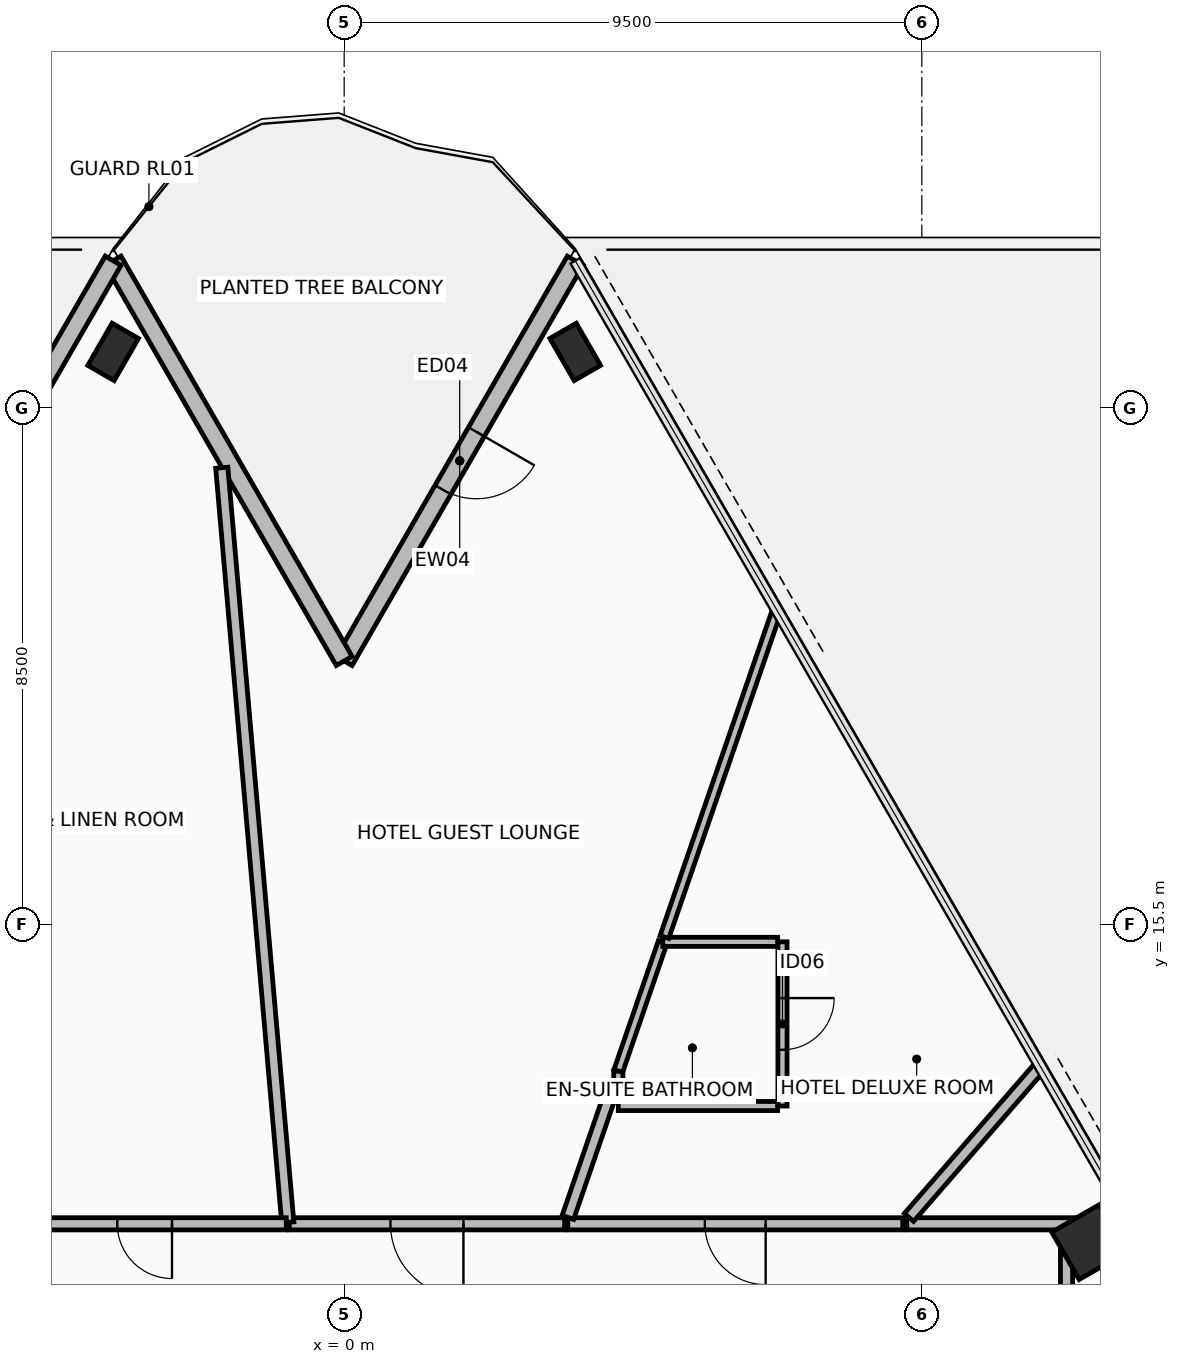
"""IFC4 building model, lengths in metres.
Left out: names, types, materials, properties, quantities, classifications, styles, units other than length and angle.
Written with IfcOpenShell. Run it as: python <this file> out.ifc"""

import sys

from ifc_helpers import new_model, si_unit, direction, frame, frame_2d, origin, origin_2d, place, context, subcontext, project, spatial, rectangle, hollow_rectangle, extrude, element, fill, save


model = new_model("IFC4")
c1 = context("Model", 3, precision=1e-05, world=origin(), true_north=direction((0.0, 1.0)))
c2 = subcontext(c1, "Body", "Model", "MODEL_VIEW")
j1 = project(units=[si_unit("LENGTHUNIT", "METRE"), si_unit("PLANEANGLEUNIT", "RADIAN")], contexts=[c1])
p1 = place(None, origin())
s1 = spatial("IfcSite", under=j1, at=p1, CompositionType="ELEMENT")
p2 = place(p1, origin())
s2 = spatial("IfcBuilding", under=s1, at=p2, CompositionType="ELEMENT")
p3 = place(p2, frame((0.0, 0.0, 31.8)))
s3 = spatial("IfcBuildingStorey", under=s2, at=p3, CompositionType="ELEMENT", Elevation=31.8)
p4 = place(p3, frame((-3.8, 24.918, 0.0), z_axis=(0.0, 0.0, 1.0), x_axis=(0.500001511499, 0.866024531118, 0.0)))
e1 = element("IfcColumn", 1, at=p4, inside=s3, PredefinedType="COLUMN", context=c2, shape_type="SweptSolid", body=[
    extrude(hollow_rectangle(XDim=0.5, YDim=0.8, WallThickness=0.04, at=origin_2d()), origin(), (0.0, 0.0, 1.0), 3.45),
])
p5 = place(p3, frame((12.252, 10.279, 0.0), z_axis=(0.0, 0.0, 1.0), x_axis=(-0.500001511499, 0.866024531118, 0.0)))
e2 = element("IfcColumn", 2, at=p5, inside=s3, PredefinedType="COLUMN", context=c2, shape_type="SweptSolid", body=[
    extrude(hollow_rectangle(XDim=0.9, YDim=0.9, WallThickness=0.05, at=origin_2d()), origin(), (0.0, 0.0, 1.0), 3.45),
])
p6 = place(p3, frame((3.8, 24.918, 0.0), z_axis=(0.0, 0.0, 1.0), x_axis=(-0.500001511499, 0.866024531118, 0.0)))
e3 = element("IfcColumn", 3, at=p6, inside=s3, PredefinedType="COLUMN", context=c2, shape_type="SweptSolid", body=[
    extrude(hollow_rectangle(XDim=0.5, YDim=0.8, WallThickness=0.04, at=origin_2d()), origin(), (0.0, 0.0, 1.0), 3.45),
])
p7 = place(p3, frame((3.8, 26.418, 0.0), z_axis=(0.0, 0.0, 1.0), x_axis=(-0.500005158081, -0.866022425744, 0.0)))
e4 = element("IfcWall", 4, at=p7, inside=s3, PredefinedType="STANDARD", context=c2, shape_type="SweptSolid", body=[
    extrude(rectangle(XDim=7.6, YDim=0.3, at=frame_2d((3.8, 0.0))), origin(), (0.0, 0.0, 1.0), 2.47),
])
p8 = place(p7, frame((3.25, 0.0, 0.0)))
e5 = element("IfcOpeningElement", 5, at=p8, cuts=e4, PredefinedType="OPENING", context=c2, shape_type="SweptSolid", body=[
    extrude(rectangle(XDim=1.1, YDim=2.2, at=frame_2d((0.55, 1.1))), frame((0.0, 0.16, 0.0), z_axis=(0.0, -1.0, 0.0), x_axis=(1.0, 0.0, 0.0)), (0.0, 0.0, 1.0), 0.32),
])
p9 = place(p3, frame((0.0, 19.836, 0.0), z_axis=(0.0, 0.0, 1.0), x_axis=(-0.500005158081, 0.866022425744, 0.0)))
e6 = element("IfcWall", 6, at=p9, inside=s3, PredefinedType="STANDARD", context=c2, shape_type="SweptSolid", body=[
    extrude(rectangle(XDim=7.6, YDim=0.3, at=frame_2d((3.8, 0.0))), origin(), (0.0, 0.0, 1.0), 2.47),
])
p10 = place(p3, frame((-3.8, 26.418, 0.0), z_axis=(0.0, 0.0, 1.0), x_axis=(-0.499999546436, -0.86602566565, 0.0)))
e7 = element("IfcWall", 7, at=p10, inside=s3, PredefinedType="STANDARD", context=c2, shape_type="SweptSolid", body=[
    extrude(rectangle(XDim=53.312, YDim=0.3, at=frame_2d((26.656, 0.0))), origin(), (0.0, 0.0, 1.0), 3.275),
])
p11 = place(p10, frame((25.756, 0.0, 0.0)))
e8 = element("IfcOpeningElement", 8, at=p11, cuts=e7, PredefinedType="OPENING", context=c2, shape_type="SweptSolid", body=[
    extrude(rectangle(XDim=1.8, YDim=2.3, at=frame_2d((0.9, 1.15))), frame((0.0, 0.16, 0.0), z_axis=(0.0, -1.0, 0.0), x_axis=(1.0, 0.0, 0.0)), (0.0, 0.0, 1.0), 0.32),
])
p12 = place(p10, frame((12.578, 0.0, 0.85)))
e9 = element("IfcOpeningElement", 9, at=p12, cuts=e7, PredefinedType="OPENING", context=c2, shape_type="SweptSolid", body=[
    extrude(rectangle(XDim=1.5, YDim=2.1, at=frame_2d((0.75, 1.05))), frame((0.0, 0.16, 0.0), z_axis=(0.0, -1.0, 0.0), x_axis=(1.0, 0.0, 0.0)), (0.0, 0.0, 1.0), 0.32),
])
p13 = place(p10, frame((39.234, 0.0, 0.85)))
e10 = element("IfcOpeningElement", 10, at=p13, cuts=e7, PredefinedType="OPENING", context=c2, shape_type="SweptSolid", body=[
    extrude(rectangle(XDim=1.5, YDim=2.1, at=frame_2d((0.75, 1.05))), frame((0.0, 0.16, 0.0), z_axis=(0.0, -1.0, 0.0), x_axis=(1.0, 0.0, 0.0)), (0.0, 0.0, 1.0), 0.32),
])
p14 = place(p3, frame((7.208, 15.217, 0.0), z_axis=(0.0, 0.0, 1.0), x_axis=(0.0, -1.0, 0.0)))
e11 = element("IfcWall", 11, at=p14, inside=s3, PredefinedType="PARTITIONING", context=c2, shape_type="SweptSolid", body=[
    extrude(rectangle(XDim=2.7, YDim=0.15, at=frame_2d((1.35, 0.0))), origin(), (0.0, 0.0, 1.0), 2.87),
])
p15 = place(p14, frame((0.925, 0.0, 0.0)))
e12 = element("IfcOpeningElement", 12, at=p15, cuts=e11, PredefinedType="OPENING", context=c2, shape_type="SweptSolid", body=[
    extrude(rectangle(XDim=0.85, YDim=2.1, at=frame_2d((0.425, 1.05))), frame((0.0, 0.085, 0.0), z_axis=(0.0, -1.0, 0.0), x_axis=(1.0, 0.0, 0.0)), (0.0, 0.0, 1.0), 0.17),
])
p16 = place(p3, frame((7.128, 12.517, 0.0), z_axis=(0.0, 0.0, 1.0), x_axis=(-1.0, 0.0, 0.0)))
e13 = element("IfcWall", 13, at=p16, inside=s3, PredefinedType="PARTITIONING", context=c2, shape_type="SweptSolid", body=[
    extrude(rectangle(XDim=2.62, YDim=0.15, at=frame_2d((1.31, 0.0))), origin(), (0.0, 0.0, 1.0), 2.87),
])
p17 = place(p3, frame((4.508, 12.597, 0.0), z_axis=(0.0, 0.0, 1.0), x_axis=(0.0, 1.0, 0.0)))
e14 = element("IfcWall", 14, at=p17, inside=s3, PredefinedType="PARTITIONING", context=c2, shape_type="SweptSolid", body=[
    extrude(rectangle(XDim=0.496, YDim=0.15, at=frame_2d((0.248, 0.0))), origin(), (0.0, 0.0, 1.0), 3.275),
])
p18 = place(p3, frame((4.508, 13.093, 0.0), z_axis=(0.0, 0.0, 1.0), x_axis=(0.325635598236, 0.945495350153, 0.0)))
e15 = element("IfcWall", 15, at=p18, inside=s3, PredefinedType="PARTITIONING", context=c2, shape_type="SweptSolid", body=[
    extrude(rectangle(XDim=2.246, YDim=0.15, at=frame_2d((1.123, 0.0))), origin(), (0.0, 0.0, 1.0), 2.87),
])
p19 = place(p3, frame((5.24, 15.217, 0.0), z_axis=(0.0, 0.0, 1.0), x_axis=(1.0, 0.0, 0.0)))
e16 = element("IfcWall", 16, at=p19, inside=s3, PredefinedType="PARTITIONING", context=c2, shape_type="SweptSolid", body=[
    extrude(rectangle(XDim=1.889, YDim=0.15, at=frame_2d((0.944, 0.0))), origin(), (0.0, 0.0, 1.0), 2.87),
])
p20 = place(p3, frame((12.944, 10.58, 0.0), z_axis=(0.0, 0.0, 1.0), x_axis=(-1.0, 0.0, 0.0)))
e17 = element("IfcWall", 17, at=p20, inside=s3, PredefinedType="PARTITIONING", context=c2, shape_type="SweptSolid", body=[
    extrude(rectangle(XDim=3.692, YDim=0.2, at=frame_2d((1.846, 0.0))), origin(), (0.0, 0.0, 1.0), 2.47),
])
p21 = place(p3, frame((9.288, 10.685, 0.0), z_axis=(0.0, 0.0, 1.0), x_axis=(0.656044714013, 0.754722023805, 0.0)))
e18 = element("IfcWall", 18, at=p21, inside=s3, PredefinedType="PARTITIONING", context=c2, shape_type="SweptSolid", body=[
    extrude(rectangle(XDim=3.293, YDim=0.2, at=frame_2d((1.646, 0.0))), origin(), (0.0, 0.0, 1.0), 2.47),
])
p22 = place(p3, frame((11.88, 6.171, 0.0), z_axis=(0.0, 0.0, 1.0), x_axis=(0.0, 1.0, 0.0)))
e19 = element("IfcWall", 19, at=p22, inside=s3, PredefinedType="PARTITIONING", context=c2, shape_type="SweptSolid", body=[
    extrude(rectangle(XDim=4.304, YDim=0.2, at=frame_2d((2.152, 0.0))), origin(), (0.0, 0.0, 1.0), 2.47),
])
p23 = place(p22, frame((1.552, 0.0, 0.0)))
e20 = element("IfcOpeningElement", 20, at=p23, cuts=e19, PredefinedType="OPENING", context=c2, shape_type="SweptSolid", body=[
    extrude(rectangle(XDim=1.2, YDim=2.15, at=frame_2d((0.6, 1.075))), frame((0.0, 0.11, 0.0), z_axis=(0.0, -1.0, 0.0), x_axis=(1.0, 0.0, 0.0)), (0.0, 0.0, 1.0), 0.22),
])
p24 = place(p3, frame((9.186, 10.58, 0.0), z_axis=(0.0, 0.0, 1.0), x_axis=(-1.0, 0.0, 0.0)))
e21 = element("IfcWall", 21, at=p24, inside=s3, PredefinedType="PARTITIONING", context=c2, shape_type="SweptSolid", body=[
    extrude(rectangle(XDim=5.508, YDim=0.2, at=frame_2d((2.754, 0.0))), origin(), (0.0, 0.0, 1.0), 2.87),
])
p25 = place(p24, frame((2.254, 0.0, 0.0)))
e22 = element("IfcOpeningElement", 22, at=p25, cuts=e21, PredefinedType="OPENING", context=c2, shape_type="SweptSolid", body=[
    extrude(rectangle(XDim=1.0, YDim=2.15, at=frame_2d((0.5, 1.075))), frame((0.0, 0.11, 0.0), z_axis=(0.0, -1.0, 0.0), x_axis=(1.0, 0.0, 0.0)), (0.0, 0.0, 1.0), 0.22),
])
p26 = place(p3, frame((3.679, 10.685, 0.0), z_axis=(0.0, 0.0, 1.0), x_axis=(0.325506719361, 0.945539727167, 0.0)))
e23 = element("IfcWall", 23, at=p26, inside=s3, PredefinedType="PARTITIONING", context=c2, shape_type="SweptSolid", body=[
    extrude(rectangle(XDim=2.301, YDim=0.2, at=frame_2d((1.15, 0.0))), origin(), (0.0, 0.0, 1.0), 3.275),
])
p27 = place(p3, frame((5.267, 15.297, 0.0), z_axis=(0.0, 0.0, 1.0), x_axis=(0.325605473746, 0.945505724714, 0.0)))
e24 = element("IfcWall", 24, at=p27, inside=s3, PredefinedType="PARTITIONING", context=c2, shape_type="SweptSolid", body=[
    extrude(rectangle(XDim=5.684, YDim=0.15, at=frame_2d((2.842, 0.0))), origin(), (0.0, 0.0, 1.0), 2.47),
])
p28 = place(p3, frame((3.625, 10.58, 0.0), z_axis=(0.0, 0.0, 1.0), x_axis=(-1.0, 0.0, 0.0)))
e25 = element("IfcWall", 25, at=p28, inside=s3, PredefinedType="PARTITIONING", context=c2, shape_type="SweptSolid", body=[
    extrude(rectangle(XDim=4.528, YDim=0.2, at=frame_2d((2.264, 0.0))), origin(), (0.0, 0.0, 1.0), 2.62),
])
p29 = place(p28, frame((1.664, 0.0, 0.0)))
e26 = element("IfcOpeningElement", 26, at=p29, cuts=e25, PredefinedType="OPENING", context=c2, shape_type="SweptSolid", body=[
    extrude(rectangle(XDim=1.2, YDim=2.15, at=frame_2d((0.6, 1.075))), frame((0.0, 0.11, 0.0), z_axis=(0.0, -1.0, 0.0), x_axis=(1.0, 0.0, 0.0)), (0.0, 0.0, 1.0), 0.22),
])
p30 = place(p3, frame((-0.927, 10.603, 0.0), z_axis=(0.0, 0.0, 1.0), x_axis=(-0.08716403318, 0.996193972738, 0.0)))
e27 = element("IfcWall", 27, at=p30, inside=s3, PredefinedType="PARTITIONING", context=c2, shape_type="SweptSolid", body=[
    extrude(rectangle(XDim=12.458, YDim=0.2, at=frame_2d((6.229, 0.0))), origin(), (0.0, 0.0, 1.0), 3.275),
])
p31 = place(p3, frame((-0.953, 10.58, 0.0), z_axis=(0.0, 0.0, 1.0), x_axis=(-1.0, 0.0, 0.0)))
e28 = element("IfcWall", 28, at=p31, inside=s3, PredefinedType="PARTITIONING", context=c2, shape_type="SweptSolid", body=[
    extrude(rectangle(XDim=4.658, YDim=0.2, at=frame_2d((2.329, 0.0))), origin(), (0.0, 0.0, 1.0), 3.275),
])
p32 = place(p31, frame((1.879, 0.0, 0.0)))
e29 = element("IfcOpeningElement", 29, at=p32, cuts=e28, PredefinedType="OPENING", context=c2, shape_type="SweptSolid", body=[
    extrude(rectangle(XDim=0.9, YDim=2.1, at=frame_2d((0.45, 1.05))), frame((0.0, 0.11, 0.0), z_axis=(0.0, -1.0, 0.0), x_axis=(1.0, 0.0, 0.0)), (0.0, 0.0, 1.0), 0.22),
])
p33 = place(p8, origin())
e30 = element("IfcDoor", 30, at=p33, inside=s3, OperationType="SINGLE_SWING_LEFT", PredefinedType="DOOR", context=c2, shape_type="SweptSolid", body=[
    extrude(rectangle(XDim=1.1, YDim=2.2, at=frame_2d((0.55, 1.1))), frame((0.0, 0.025, 0.0), z_axis=(0.0, -1.0, 0.0), x_axis=(1.0, 0.0, 0.0)), (0.0, 0.0, 1.0), 0.05),
])
fill(e5, e30)
p34 = place(p15, origin())
e31 = element("IfcDoor", 31, at=p34, inside=s3, OperationType="SINGLE_SWING_RIGHT", PredefinedType="DOOR", context=c2, shape_type="SweptSolid", body=[
    extrude(rectangle(XDim=0.85, YDim=2.1, at=frame_2d((0.425, 1.05))), frame((0.0, 0.025, 0.0), z_axis=(0.0, -1.0, 0.0), x_axis=(1.0, 0.0, 0.0)), (0.0, 0.0, 1.0), 0.05),
])
fill(e12, e31)
p35 = place(p25, origin())
e32 = element("IfcDoor", 32, at=p35, inside=s3, OperationType="SINGLE_SWING_LEFT", PredefinedType="DOOR", context=c2, shape_type="SweptSolid", body=[
    extrude(rectangle(XDim=1.0, YDim=2.15, at=frame_2d((0.5, 1.075))), frame((0.0, 0.025, 0.0), z_axis=(0.0, -1.0, 0.0), x_axis=(1.0, 0.0, 0.0)), (0.0, 0.0, 1.0), 0.05),
])
fill(e22, e32)
p36 = place(p29, origin())
e33 = element("IfcDoor", 33, at=p36, inside=s3, OperationType="SINGLE_SWING_LEFT", PredefinedType="DOOR", context=c2, shape_type="SweptSolid", body=[
    extrude(rectangle(XDim=1.2, YDim=2.15, at=frame_2d((0.6, 1.075))), frame((0.0, 0.025, 0.0), z_axis=(0.0, -1.0, 0.0), x_axis=(1.0, 0.0, 0.0)), (0.0, 0.0, 1.0), 0.05),
])
fill(e26, e33)
p37 = place(p32, origin())
e34 = element("IfcDoor", 34, at=p37, inside=s3, OperationType="SINGLE_SWING_LEFT", PredefinedType="DOOR", context=c2, shape_type="SweptSolid", body=[
    extrude(rectangle(XDim=0.9, YDim=2.1, at=frame_2d((0.45, 1.05))), frame((0.0, 0.025, 0.0), z_axis=(0.0, -1.0, 0.0), x_axis=(1.0, 0.0, 0.0)), (0.0, 0.0, 1.0), 0.05),
])
fill(e29, e34)
save(model, sys.argv[1])
